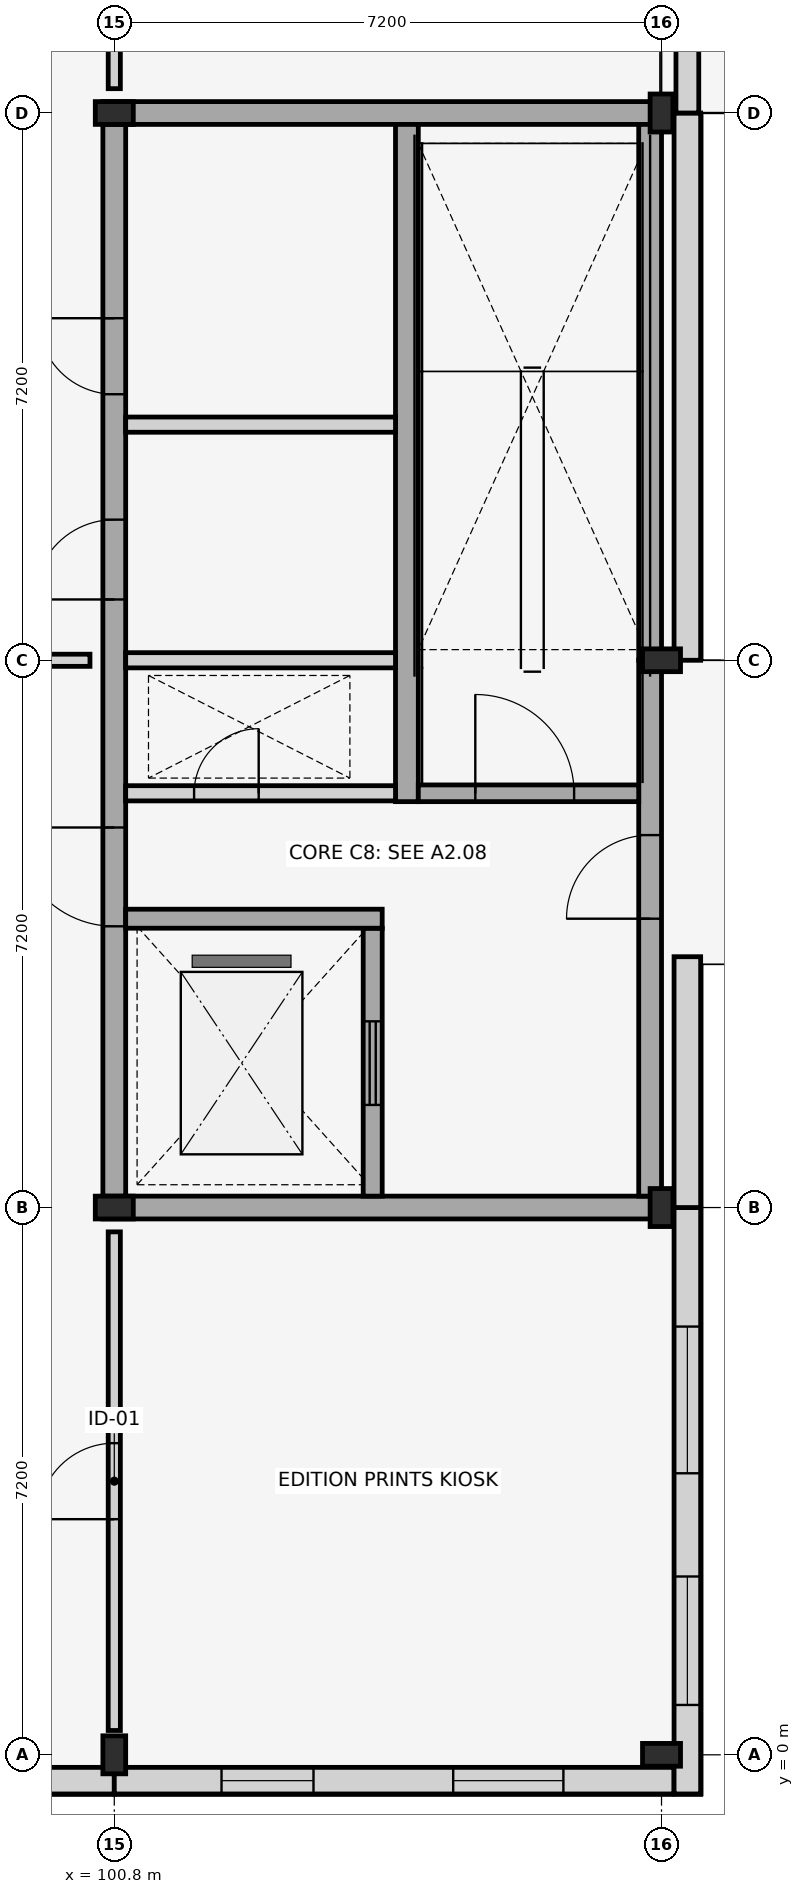
"""IFC4 building model, lengths in metres.
Left out: names, types, materials, properties, quantities, classifications, styles, units other than length and angle.
Written with IfcOpenShell. Run it as: python <this file> out.ifc"""

import sys

from ifc_helpers import new_model, si_unit, direction, frame, frame_2d, origin, origin_2d, place, context, subcontext, project, spatial, rectangle, i_section, extrude, element, fill, save


model = new_model("IFC4")
c1 = context("Model", 3, precision=1e-05, world=origin(), true_north=direction((0.0, 1.0)))
c2 = subcontext(c1, "Body", "Model", "MODEL_VIEW")
j1 = project(units=[si_unit("LENGTHUNIT", "METRE"), si_unit("PLANEANGLEUNIT", "RADIAN")], contexts=[c1])
p1 = place(None, origin())
s1 = spatial("IfcSite", under=j1, at=p1, CompositionType="ELEMENT")
p2 = place(p1, origin())
s2 = spatial("IfcBuilding", under=s1, at=p2, CompositionType="ELEMENT")
p3 = place(p2, origin())
s3 = spatial("IfcBuildingStorey", under=s2, at=p3, CompositionType="ELEMENT", Elevation=0.0)
for number, where, z_axis, x_axis in (
    (1, (100.8, 0.0, 0.0), (0.0, 0.0, 1.0), (1.0, 0.0, 0.0)),
    (2, (100.8, 7.2, 0.0), (0.0, 0.0, 1.0), (0.0, 1.0, 0.0)),
    (3, (100.8, 21.6, 0.0), (0.0, 0.0, 1.0), (0.0, 1.0, 0.0)),
    (4, (108.0, 0.0, 0.0), (0.0, 0.0, 1.0), (0.0, 1.0, 0.0)),
    (5, (108.0, 7.2, 0.0), (0.0, 0.0, 1.0), (1.0, 0.0, 0.0)),
    (6, (108.0, 14.4, 0.0), (0.0, 0.0, 1.0), (0.0, 1.0, 0.0)),
    (7, (108.0, 21.6, 0.0), (0.0, 0.0, 1.0), (1.0, 0.0, 0.0)),
):
    element("IfcColumn", number, at=place(p3, frame(where, z_axis=z_axis, x_axis=x_axis)), inside=s3, PredefinedType="COLUMN", context=c2, shape_type="SweptSolid", body=[
        extrude(i_section(OverallWidth=0.3, OverallDepth=0.5, WebThickness=0.014, FlangeThickness=0.028, FilletRadius=0.027, at=origin_2d()), origin(), (0.0, 0.0, 1.0), 4.5),
    ])
p4 = place(p3, frame((93.6, -0.34, 0.0), z_axis=(0.0, 0.0, 1.0), x_axis=(1.0, 0.0, 0.0)))
e8 = element("IfcWall", 8, at=p4, inside=s3, PredefinedType="STANDARD", context=c2, shape_type="SweptSolid", body=[
    extrude(rectangle(XDim=7.2, YDim=0.35, at=frame_2d((3.6, 0.0))), origin(), (0.0, 0.0, 1.0), 4.5),
])
p5 = place(p4, frame((0.946, 0.0, 0.9)))
e9 = element("IfcOpeningElement", 9, at=p5, cuts=e8, PredefinedType="OPENING", context=c2, shape_type="SweptSolid", body=[
    extrude(rectangle(XDim=2.14, YDim=1.82, at=frame_2d((1.07, 0.91))), frame((0.0, 0.185, 0.0), z_axis=(0.0, -1.0, 0.0), x_axis=(1.0, 0.0, 0.0)), (0.0, 0.0, 1.0), 0.37),
])
p6 = place(p4, frame((4.699, 0.0, 0.9)))
e10 = element("IfcOpeningElement", 10, at=p6, cuts=e8, PredefinedType="OPENING", context=c2, shape_type="SweptSolid", body=[
    extrude(rectangle(XDim=0.97, YDim=1.96, at=frame_2d((0.485, 0.98))), frame((0.0, 0.185, 0.0), z_axis=(0.0, -1.0, 0.0), x_axis=(1.0, 0.0, 0.0)), (0.0, 0.0, 1.0), 0.37),
])
p7 = place(p3, frame((100.8, -0.34, 0.0), z_axis=(0.0, 0.0, 1.0), x_axis=(1.0, 0.0, 0.0)))
e11 = element("IfcWall", 11, at=p7, inside=s3, PredefinedType="STANDARD", context=c2, shape_type="SweptSolid", body=[
    extrude(rectangle(XDim=7.365, YDim=0.35, at=frame_2d((3.683, 0.0))), origin(), (0.0, 0.0, 1.0), 4.5),
])
p8 = place(p7, frame((1.411, 0.0, 0.9)))
e12 = element("IfcOpeningElement", 12, at=p8, cuts=e11, PredefinedType="OPENING", context=c2, shape_type="SweptSolid", body=[
    extrude(rectangle(XDim=1.21, YDim=1.96, at=frame_2d((0.605, 0.98))), frame((0.0, 0.185, 0.0), z_axis=(0.0, -1.0, 0.0), x_axis=(1.0, 0.0, 0.0)), (0.0, 0.0, 1.0), 0.37),
])
p9 = place(p7, frame((4.459, 0.0, 0.9)))
e13 = element("IfcOpeningElement", 13, at=p9, cuts=e11, PredefinedType="OPENING", context=c2, shape_type="SweptSolid", body=[
    extrude(rectangle(XDim=1.45, YDim=1.96, at=frame_2d((0.725, 0.98))), frame((0.0, 0.185, 0.0), z_axis=(0.0, -1.0, 0.0), x_axis=(1.0, 0.0, 0.0)), (0.0, 0.0, 1.0), 0.37),
])
p10 = place(p3, frame((108.34, -0.515, 0.0), z_axis=(0.0, 0.0, 1.0), x_axis=(0.0, 1.0, 0.0)))
e14 = element("IfcWall", 14, at=p10, inside=s3, PredefinedType="STANDARD", context=c2, shape_type="SweptSolid", body=[
    extrude(rectangle(XDim=7.715, YDim=0.35, at=frame_2d((3.857, 0.0))), origin(), (0.0, 0.0, 1.0), 4.5),
])
p11 = place(p10, frame((1.171, 0.0, 0.9)))
e15 = element("IfcOpeningElement", 15, at=p11, cuts=e14, PredefinedType="OPENING", context=c2, shape_type="SweptSolid", body=[
    extrude(rectangle(XDim=1.69, YDim=1.96, at=frame_2d((0.845, 0.98))), frame((0.0, 0.185, 0.0), z_axis=(0.0, -1.0, 0.0), x_axis=(1.0, 0.0, 0.0)), (0.0, 0.0, 1.0), 0.37),
])
p12 = place(p10, frame((4.219, 0.0, 0.9)))
e16 = element("IfcOpeningElement", 16, at=p12, cuts=e14, PredefinedType="OPENING", context=c2, shape_type="SweptSolid", body=[
    extrude(rectangle(XDim=1.93, YDim=1.96, at=frame_2d((0.965, 0.98))), frame((0.0, 0.185, 0.0), z_axis=(0.0, -1.0, 0.0), x_axis=(1.0, 0.0, 0.0)), (0.0, 0.0, 1.0), 0.37),
])
p13 = place(p3, frame((108.34, 7.2, 0.0), z_axis=(0.0, 0.0, 1.0), x_axis=(0.0, 1.0, 0.0)))
e17 = element("IfcWall", 17, at=p13, inside=s3, PredefinedType="STANDARD", context=c2, shape_type="SweptSolid", body=[
    extrude(rectangle(XDim=3.3, YDim=0.35, at=frame_2d((1.65, 0.0))), origin(), (0.0, 0.0, 1.0), 4.5),
])
p14 = place(p3, frame((108.34, 14.4, 0.0), z_axis=(0.0, 0.0, 1.0), x_axis=(0.0, 1.0, 0.0)))
e18 = element("IfcWall", 18, at=p14, inside=s3, PredefinedType="STANDARD", context=c2, shape_type="SweptSolid", body=[
    extrude(rectangle(XDim=7.2, YDim=0.35, at=frame_2d((3.6, 0.0))), origin(), (0.0, 0.0, 1.0), 4.5),
])
p15 = place(p3, frame((108.34, 21.6, 0.0), z_axis=(0.0, 0.0, 1.0), x_axis=(0.0, 1.0, 0.0)))
e19 = element("IfcWall", 19, at=p15, inside=s3, PredefinedType="STANDARD", context=c2, shape_type="SweptSolid", body=[
    extrude(rectangle(XDim=7.715, YDim=0.3, at=frame_2d((3.857, 0.0))), origin(), (0.0, 0.0, 1.0), 3.95),
])
p16 = place(p15, frame((2.65, 0.0, 0.0)))
e20 = element("IfcOpeningElement", 20, at=p16, cuts=e19, PredefinedType="OPENING", context=c2, shape_type="SweptSolid", body=[
    extrude(rectangle(XDim=1.9, YDim=2.45, at=frame_2d((0.95, 1.225))), frame((0.0, 0.16, 0.0), z_axis=(0.0, -1.0, 0.0), x_axis=(1.0, 0.0, 0.0)), (0.0, 0.0, 1.0), 0.32),
])
for number, where, z_axis, x_axis in (
    (21, (100.65, 7.2, 0.0), (0.0, 0.0, 1.0), (1.0, 0.0, 0.0)),
    (22, (100.65, 21.6, 0.0), (0.0, 0.0, 1.0), (1.0, 0.0, 0.0)),
):
    element("IfcWall", number, at=place(p3, frame(where, z_axis=z_axis, x_axis=x_axis)), inside=s3, PredefinedType="SHEAR", context=c2, shape_type="SweptSolid", body=[
        extrude(rectangle(XDim=7.35, YDim=0.3, at=frame_2d((3.675, 0.0))), origin(), (0.0, 0.0, 1.0), 4.28),
    ])
p17 = place(p3, frame((107.85, 7.35, 0.0), z_axis=(0.0, 0.0, 1.0), x_axis=(0.0, 1.0, 0.0)))
e23 = element("IfcWall", 23, at=p17, inside=s3, PredefinedType="SHEAR", context=c2, shape_type="SweptSolid", body=[
    extrude(rectangle(XDim=7.05, YDim=0.3, at=frame_2d((3.525, 0.0))), origin(), (0.0, 0.0, 1.0), 4.28),
])
p18 = place(p17, frame((3.65, 0.0, 0.0)))
e24 = element("IfcOpeningElement", 24, at=p18, cuts=e23, PredefinedType="OPENING", context=c2, shape_type="SweptSolid", body=[
    extrude(rectangle(XDim=1.1, YDim=2.2, at=frame_2d((0.55, 1.1))), frame((0.0, 0.16, 0.0), z_axis=(0.0, -1.0, 0.0), x_axis=(1.0, 0.0, 0.0)), (0.0, 0.0, 1.0), 0.32),
])
p19 = place(p3, frame((107.85, 14.4, 0.0), z_axis=(0.0, 0.0, 1.0), x_axis=(0.0, 1.0, 0.0)))
e25 = element("IfcWall", 25, at=p19, inside=s3, PredefinedType="SHEAR", context=c2, shape_type="SweptSolid", body=[
    extrude(rectangle(XDim=7.05, YDim=0.3, at=frame_2d((3.525, 0.0))), origin(), (0.0, 0.0, 1.0), 4.28),
])
p20 = place(p3, frame((100.8, 7.35, 0.0), z_axis=(0.0, 0.0, 1.0), x_axis=(0.0, 1.0, 0.0)))
e26 = element("IfcWall", 26, at=p20, inside=s3, PredefinedType="SHEAR", context=c2, shape_type="SweptSolid", body=[
    extrude(rectangle(XDim=14.1, YDim=0.3, at=frame_2d((7.05, 0.0))), origin(), (0.0, 0.0, 1.0), 4.28),
])
p21 = place(p20, frame((3.55, 0.0, 0.0)))
e27 = element("IfcOpeningElement", 27, at=p21, cuts=e26, PredefinedType="OPENING", context=c2, shape_type="SweptSolid", body=[
    extrude(rectangle(XDim=1.3, YDim=2.2, at=frame_2d((0.65, 1.1))), frame((0.0, 0.16, 0.0), z_axis=(0.0, -1.0, 0.0), x_axis=(1.0, 0.0, 0.0)), (0.0, 0.0, 1.0), 0.32),
])
p22 = place(p20, frame((7.85, 0.0, 0.0)))
e28 = element("IfcOpeningElement", 28, at=p22, cuts=e26, PredefinedType="OPENING", context=c2, shape_type="SweptSolid", body=[
    extrude(rectangle(XDim=1.05, YDim=2.15, at=frame_2d((0.525, 1.075))), frame((0.0, 0.16, 0.0), z_axis=(0.0, -1.0, 0.0), x_axis=(1.0, 0.0, 0.0)), (0.0, 0.0, 1.0), 0.32),
])
p23 = place(p20, frame((10.55, 0.0, 0.0)))
e29 = element("IfcOpeningElement", 29, at=p23, cuts=e26, PredefinedType="OPENING", context=c2, shape_type="SweptSolid", body=[
    extrude(rectangle(XDim=1.0, YDim=2.15, at=frame_2d((0.5, 1.075))), frame((0.0, 0.16, 0.0), z_axis=(0.0, -1.0, 0.0), x_axis=(1.0, 0.0, 0.0)), (0.0, 0.0, 1.0), 0.32),
])
p24 = place(p3, frame((104.2, 7.35, 0.0), z_axis=(0.0, 0.0, 1.0), x_axis=(0.0, 1.0, 0.0)))
e30 = element("IfcWall", 30, at=p24, inside=s3, PredefinedType="SHEAR", context=c2, shape_type="SweptSolid", body=[
    extrude(rectangle(XDim=3.525, YDim=0.25, at=frame_2d((1.762, 0.0))), origin(), (0.0, 0.0, 1.0), 4.28),
])
p25 = place(p24, frame((1.2, 0.0, 0.0)))
e31 = element("IfcOpeningElement", 31, at=p25, cuts=e30, PredefinedType="OPENING", context=c2, shape_type="SweptSolid", body=[
    extrude(rectangle(XDim=1.1, YDim=2.15, at=frame_2d((0.55, 1.075))), frame((0.0, 0.135, 0.0), z_axis=(0.0, -1.0, 0.0), x_axis=(1.0, 0.0, 0.0)), (0.0, 0.0, 1.0), 0.27),
])
p26 = place(p3, frame((104.65, 12.54, 0.0), z_axis=(0.0, 0.0, 1.0), x_axis=(0.0, 1.0, 0.0)))
e32 = element("IfcWall", 32, at=p26, inside=s3, PredefinedType="SHEAR", context=c2, shape_type="SweptSolid", body=[
    extrude(rectangle(XDim=8.91, YDim=0.3, at=frame_2d((4.455, 0.0))), origin(), (0.0, 0.0, 1.0), 4.28),
])
p27 = place(p3, frame((100.95, 12.65, 0.0), z_axis=(0.0, 0.0, 1.0), x_axis=(1.0, 0.0, 0.0)))
e33 = element("IfcWall", 33, at=p27, inside=s3, PredefinedType="PLUMBINGWALL", context=c2, shape_type="SweptSolid", body=[
    extrude(rectangle(XDim=3.55, YDim=0.2, at=frame_2d((1.775, 0.0))), origin(), (0.0, 0.0, 1.0), 3.7),
])
p28 = place(p27, frame((0.9, 0.0, 0.0)))
e34 = element("IfcOpeningElement", 34, at=p28, cuts=e33, PredefinedType="OPENING", context=c2, shape_type="SweptSolid", body=[
    extrude(rectangle(XDim=0.85, YDim=2.05, at=frame_2d((0.425, 1.025))), frame((0.0, 0.11, 0.0), z_axis=(0.0, -1.0, 0.0), x_axis=(1.0, 0.0, 0.0)), (0.0, 0.0, 1.0), 0.22),
])
p29 = place(p3, frame((104.8, 12.65, 0.0), z_axis=(0.0, 0.0, 1.0), x_axis=(1.0, 0.0, 0.0)))
e35 = element("IfcWall", 35, at=p29, inside=s3, PredefinedType="SHEAR", context=c2, shape_type="SweptSolid", body=[
    extrude(rectangle(XDim=2.9, YDim=0.22, at=frame_2d((1.45, 0.0))), origin(), (0.0, 0.0, 1.0), 4.28),
])
p30 = place(p29, frame((0.75, 0.0, 0.0)))
e36 = element("IfcOpeningElement", 36, at=p30, cuts=e35, PredefinedType="OPENING", context=c2, shape_type="SweptSolid", body=[
    extrude(rectangle(XDim=1.3, YDim=2.2, at=frame_2d((0.65, 1.1))), frame((0.0, 0.12, 0.0), z_axis=(0.0, -1.0, 0.0), x_axis=(1.0, 0.0, 0.0)), (0.0, 0.0, 1.0), 0.24),
])
p31 = place(p3, frame((100.95, 11.0, 0.0), z_axis=(0.0, 0.0, 1.0), x_axis=(1.0, 0.0, 0.0)))
e37 = element("IfcWall", 37, at=p31, inside=s3, PredefinedType="SHEAR", context=c2, shape_type="SweptSolid", body=[
    extrude(rectangle(XDim=3.375, YDim=0.25, at=frame_2d((1.688, 0.0))), origin(), (0.0, 0.0, 1.0), 4.28),
])
for number, where, z_axis, x_axis in (
    (38, (100.95, 14.4, 0.0), (0.0, 0.0, 1.0), (1.0, 0.0, 0.0)),
    (39, (100.95, 17.5, 0.0), (0.0, 0.0, 1.0), (1.0, 0.0, 0.0)),
):
    element("IfcWall", number, at=place(p3, frame(where, z_axis=z_axis, x_axis=x_axis)), inside=s3, PredefinedType="PLUMBINGWALL", context=c2, shape_type="SweptSolid", body=[
        extrude(rectangle(XDim=3.55, YDim=0.2, at=frame_2d((1.775, 0.0))), origin(), (0.0, 0.0, 1.0), 3.7),
    ])
p32 = place(p3, frame((100.8, 0.32, 0.0), z_axis=(0.0, 0.0, 1.0), x_axis=(0.0, 1.0, 0.0)))
e40 = element("IfcWall", 40, at=p32, inside=s3, PredefinedType="PARTITIONING", context=c2, shape_type="SweptSolid", body=[
    extrude(rectangle(XDim=6.56, YDim=0.16, at=frame_2d((3.28, 0.0))), origin(), (0.0, 0.0, 1.0), 3.45),
])
p33 = place(p32, frame((2.78, 0.0, 0.0)))
e41 = element("IfcOpeningElement", 41, at=p33, cuts=e40, PredefinedType="OPENING", context=c2, shape_type="SweptSolid", body=[
    extrude(rectangle(XDim=1.0, YDim=2.15, at=frame_2d((0.5, 1.075))), frame((0.0, 0.09, 0.0), z_axis=(0.0, -1.0, 0.0), x_axis=(1.0, 0.0, 0.0)), (0.0, 0.0, 1.0), 0.18),
])
p34 = place(p3, frame((93.92, 14.4, 0.0), z_axis=(0.0, 0.0, 1.0), x_axis=(1.0, 0.0, 0.0)))
e42 = element("IfcWall", 42, at=p34, inside=s3, PredefinedType="PARTITIONING", context=c2, shape_type="SweptSolid", body=[
    extrude(rectangle(XDim=6.56, YDim=0.16, at=frame_2d((3.28, 0.0))), origin(), (0.0, 0.0, 1.0), 3.45),
])
p35 = place(p34, frame((2.68, 0.0, 0.0)))
e43 = element("IfcOpeningElement", 43, at=p35, cuts=e42, PredefinedType="OPENING", context=c2, shape_type="SweptSolid", body=[
    extrude(rectangle(XDim=1.2, YDim=2.25, at=frame_2d((0.6, 1.125))), frame((0.0, 0.09, 0.0), z_axis=(0.0, -1.0, 0.0), x_axis=(1.0, 0.0, 0.0)), (0.0, 0.0, 1.0), 0.18),
])
p36 = place(p3, frame((100.8, 21.92, 0.0), z_axis=(0.0, 0.0, 1.0), x_axis=(0.0, 1.0, 0.0)))
e44 = element("IfcWall", 44, at=p36, inside=s3, PredefinedType="PARTITIONING", context=c2, shape_type="SweptSolid", body=[
    extrude(rectangle(XDim=6.56, YDim=0.16, at=frame_2d((3.28, 0.0))), origin(), (0.0, 0.0, 1.0), 3.45),
])
p37 = place(p36, frame((2.48, 0.0, 0.0)))
e45 = element("IfcOpeningElement", 45, at=p37, cuts=e44, PredefinedType="OPENING", context=c2, shape_type="SweptSolid", body=[
    extrude(rectangle(XDim=1.6, YDim=2.35, at=frame_2d((0.8, 1.175))), frame((0.0, 0.09, 0.0), z_axis=(0.0, -1.0, 0.0), x_axis=(1.0, 0.0, 0.0)), (0.0, 0.0, 1.0), 0.18),
])
p38 = place(p8, origin())
e46 = element("IfcWindow", 46, at=p38, inside=s3, PartitioningType="SINGLE_PANEL", PredefinedType="WINDOW", context=c2, shape_type="SweptSolid", body=[
    extrude(rectangle(XDim=1.21, YDim=1.96, at=frame_2d((0.605, 0.98))), frame((0.0, 0.03, 0.0), z_axis=(0.0, -1.0, 0.0), x_axis=(1.0, 0.0, 0.0)), (0.0, 0.0, 1.0), 0.06),
])
fill(e12, e46)
p39 = place(p9, origin())
e47 = element("IfcWindow", 47, at=p39, inside=s3, PartitioningType="SINGLE_PANEL", PredefinedType="WINDOW", context=c2, shape_type="SweptSolid", body=[
    extrude(rectangle(XDim=1.45, YDim=1.96, at=frame_2d((0.725, 0.98))), frame((0.0, 0.03, 0.0), z_axis=(0.0, -1.0, 0.0), x_axis=(1.0, 0.0, 0.0)), (0.0, 0.0, 1.0), 0.06),
])
fill(e13, e47)
p40 = place(p11, origin())
e48 = element("IfcWindow", 48, at=p40, inside=s3, PartitioningType="SINGLE_PANEL", PredefinedType="WINDOW", context=c2, shape_type="SweptSolid", body=[
    extrude(rectangle(XDim=1.69, YDim=1.96, at=frame_2d((0.845, 0.98))), frame((0.0, 0.03, 0.0), z_axis=(0.0, -1.0, 0.0), x_axis=(1.0, 0.0, 0.0)), (0.0, 0.0, 1.0), 0.06),
])
fill(e15, e48)
p41 = place(p12, origin())
e49 = element("IfcWindow", 49, at=p41, inside=s3, PartitioningType="SINGLE_PANEL", PredefinedType="WINDOW", context=c2, shape_type="SweptSolid", body=[
    extrude(rectangle(XDim=1.93, YDim=1.96, at=frame_2d((0.965, 0.98))), frame((0.0, 0.03, 0.0), z_axis=(0.0, -1.0, 0.0), x_axis=(1.0, 0.0, 0.0)), (0.0, 0.0, 1.0), 0.06),
])
fill(e16, e49)
p42 = place(p18, origin())
e50 = element("IfcDoor", 50, at=p42, inside=s3, OperationType="SINGLE_SWING_LEFT", PredefinedType="DOOR", context=c2, shape_type="SweptSolid", body=[
    extrude(rectangle(XDim=1.1, YDim=2.2, at=frame_2d((0.55, 1.1))), frame((0.0, 0.025, 0.0), z_axis=(0.0, -1.0, 0.0), x_axis=(1.0, 0.0, 0.0)), (0.0, 0.0, 1.0), 0.05),
])
fill(e24, e50)
p43 = place(p21, origin())
e51 = element("IfcDoor", 51, at=p43, inside=s3, OperationType="SINGLE_SWING_RIGHT", PredefinedType="DOOR", context=c2, shape_type="SweptSolid", body=[
    extrude(rectangle(XDim=1.3, YDim=2.2, at=frame_2d((0.65, 1.1))), frame((0.0, 0.025, 0.0), z_axis=(0.0, -1.0, 0.0), x_axis=(1.0, 0.0, 0.0)), (0.0, 0.0, 1.0), 0.05),
])
fill(e27, e51)
p44 = place(p22, origin())
e52 = element("IfcDoor", 52, at=p44, inside=s3, OperationType="SINGLE_SWING_LEFT", PredefinedType="DOOR", context=c2, shape_type="SweptSolid", body=[
    extrude(rectangle(XDim=1.05, YDim=2.15, at=frame_2d((0.525, 1.075))), frame((0.0, 0.025, 0.0), z_axis=(0.0, -1.0, 0.0), x_axis=(1.0, 0.0, 0.0)), (0.0, 0.0, 1.0), 0.05),
])
fill(e28, e52)
p45 = place(p23, origin())
e53 = element("IfcDoor", 53, at=p45, inside=s3, OperationType="SINGLE_SWING_RIGHT", PredefinedType="DOOR", context=c2, shape_type="SweptSolid", body=[
    extrude(rectangle(XDim=1.0, YDim=2.15, at=frame_2d((0.5, 1.075))), frame((0.0, 0.025, 0.0), z_axis=(0.0, -1.0, 0.0), x_axis=(1.0, 0.0, 0.0)), (0.0, 0.0, 1.0), 0.05),
])
fill(e29, e53)
p46 = place(p25, origin())
e54 = element("IfcDoor", 54, at=p46, inside=s3, OperationType="SLIDING_TO_LEFT", PredefinedType="DOOR", context=c2, shape_type="SweptSolid", body=[
    extrude(rectangle(XDim=1.1, YDim=2.15, at=frame_2d((0.55, 1.075))), frame((0.0, 0.025, 0.0), z_axis=(0.0, -1.0, 0.0), x_axis=(1.0, 0.0, 0.0)), (0.0, 0.0, 1.0), 0.05),
])
fill(e31, e54)
p47 = place(p28, origin())
e55 = element("IfcDoor", 55, at=p47, inside=s3, OperationType="SINGLE_SWING_RIGHT", PredefinedType="TRAPDOOR", context=c2, shape_type="SweptSolid", body=[
    extrude(rectangle(XDim=0.85, YDim=2.05, at=frame_2d((0.425, 1.025))), frame((0.0, 0.025, 0.0), z_axis=(0.0, -1.0, 0.0), x_axis=(1.0, 0.0, 0.0)), (0.0, 0.0, 1.0), 0.05),
])
fill(e34, e55)
p48 = place(p30, origin())
e56 = element("IfcDoor", 56, at=p48, inside=s3, OperationType="SINGLE_SWING_LEFT", PredefinedType="DOOR", context=c2, shape_type="SweptSolid", body=[
    extrude(rectangle(XDim=1.3, YDim=2.2, at=frame_2d((0.65, 1.1))), frame((0.0, 0.025, 0.0), z_axis=(0.0, -1.0, 0.0), x_axis=(1.0, 0.0, 0.0)), (0.0, 0.0, 1.0), 0.05),
])
fill(e36, e56)
p49 = place(p33, origin())
e57 = element("IfcDoor", 57, at=p49, inside=s3, OperationType="SINGLE_SWING_LEFT", PredefinedType="DOOR", context=c2, shape_type="SweptSolid", body=[
    extrude(rectangle(XDim=1.0, YDim=2.15, at=frame_2d((0.5, 1.075))), frame((0.0, 0.025, 0.0), z_axis=(0.0, -1.0, 0.0), x_axis=(1.0, 0.0, 0.0)), (0.0, 0.0, 1.0), 0.05),
])
fill(e41, e57)
save(model, sys.argv[1])
